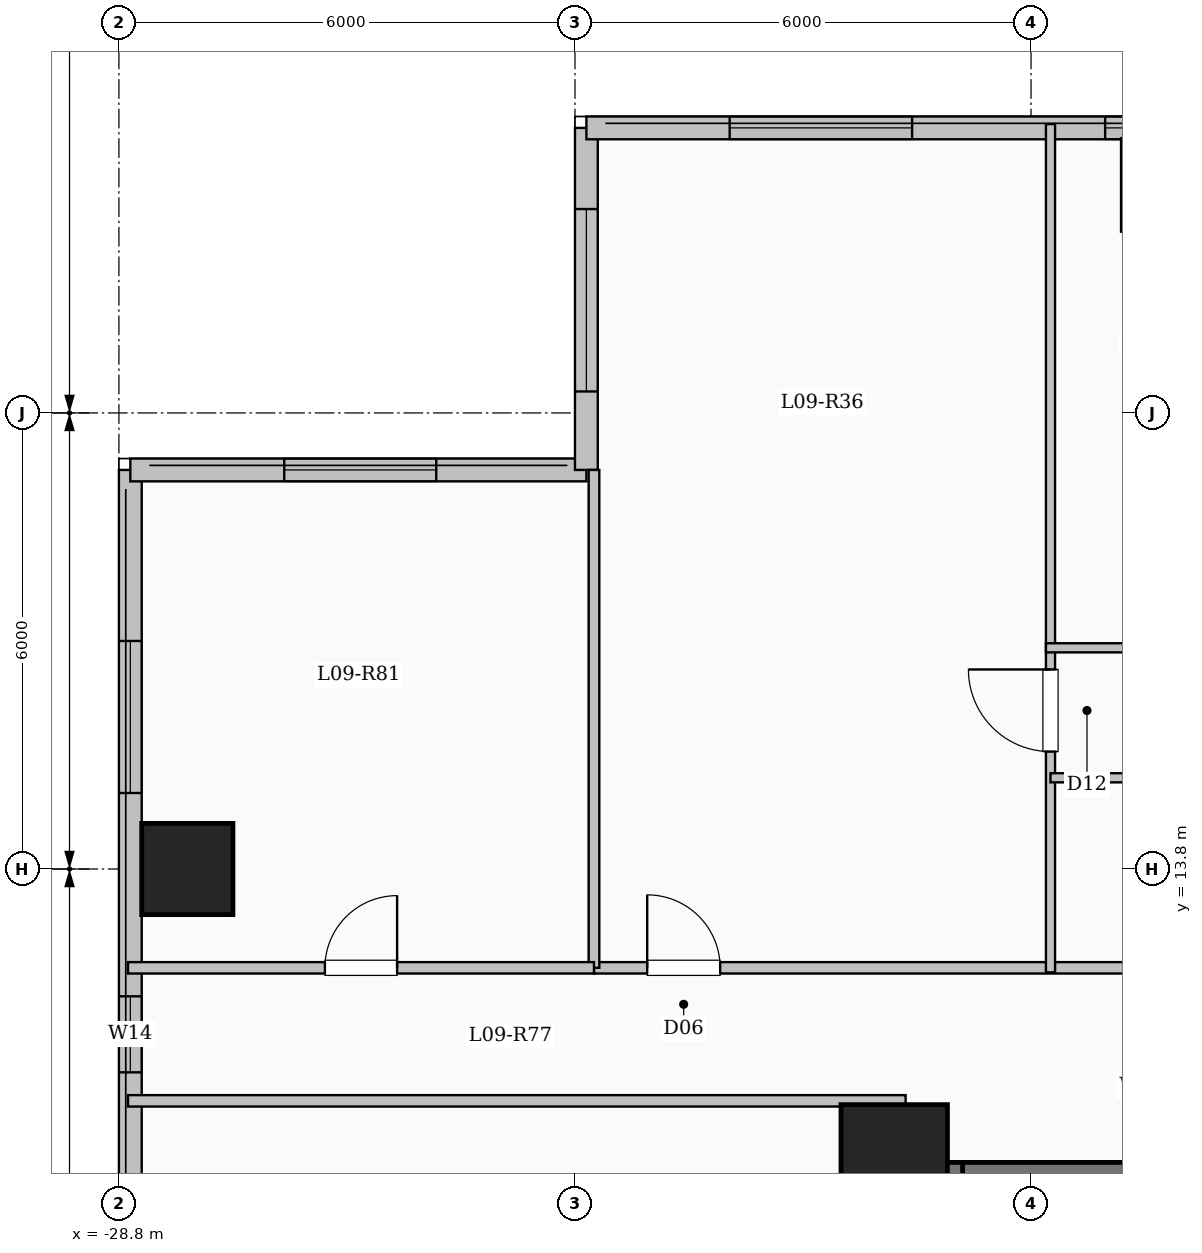
"""IFC4 building model, lengths in metres.
Left out: names, types, materials, properties, quantities, classifications, styles, units other than length and angle.
Written with IfcOpenShell. Run it as: python <this file> out.ifc"""

import sys

from ifc_helpers import new_model, si_unit, direction, frame, frame_2d, origin, origin_2d, place, context, subcontext, project, spatial, rectangle, extrude, element, fill, save


model = new_model("IFC4")
c1 = context("Model", 3, precision=1e-05, world=origin(), true_north=direction((0.0, 1.0)))
c2 = subcontext(c1, "Body", "Model", "MODEL_VIEW")
j1 = project(units=[si_unit("LENGTHUNIT", "METRE"), si_unit("PLANEANGLEUNIT", "RADIAN")], contexts=[c1])
p1 = place(None, origin())
s1 = spatial("IfcSite", under=j1, at=p1, CompositionType="ELEMENT")
p2 = place(p1, origin())
s2 = spatial("IfcBuilding", under=s1, at=p2, CompositionType="ELEMENT")
p3 = place(p2, frame((0.0, 0.0, 37.4)))
s3 = spatial("IfcBuildingStorey", under=s2, at=p3, CompositionType="ELEMENT", Elevation=37.4)
p4 = place(p3, frame((-18.6, 10.0, 0.0), z_axis=(0.0, 0.0, 1.0), x_axis=(1.0, 0.0, 0.0)))
e1 = element("IfcColumn", 1, at=p4, inside=s3, PredefinedType="COLUMN", context=c2, shape_type="SweptSolid", body=[
    extrude(rectangle(XDim=1.4, YDim=1.4, at=origin_2d()), origin(), (0.0, 0.0, 1.0), 3.35),
])
p5 = place(p3, frame((-27.9, 13.8, 0.0), z_axis=(0.0, 0.0, 1.0), x_axis=(1.0, 0.0, 0.0)))
e2 = element("IfcColumn", 2, at=p5, inside=s3, PredefinedType="COLUMN", context=c2, shape_type="SweptSolid", body=[
    extrude(rectangle(XDim=1.2, YDim=1.2, at=origin_2d()), origin(), (0.0, 0.0, 1.0), 3.35),
])
p6 = place(p3, frame((-28.65, -19.05, 0.0), z_axis=(0.0, 0.0, 1.0), x_axis=(0.0, 1.0, 0.0)))
e3 = element("IfcWall", 3, at=p6, inside=s3, PredefinedType="SOLIDWALL", context=c2, shape_type="SweptSolid", body=[
    extrude(rectangle(XDim=38.1, YDim=0.3, at=frame_2d((19.05, 0.0))), origin(), (0.0, 0.0, 1.0), 3.1),
])
p7 = place(p6, frame((3.15, 0.0, 0.9)))
e4 = element("IfcOpeningElement", 4, at=p7, cuts=e3, PredefinedType="OPENING", context=c2, shape_type="SweptSolid", body=[
    extrude(rectangle(XDim=2.4, YDim=1.8, at=frame_2d((1.2, 0.9))), frame((0.0, 0.16, 0.0), z_axis=(0.0, -1.0, 0.0), x_axis=(1.0, 0.0, 0.0)), (0.0, 0.0, 1.0), 0.32),
])
p8 = place(p6, frame((9.542, 0.0, 0.9)))
e5 = element("IfcOpeningElement", 5, at=p8, cuts=e3, PredefinedType="OPENING", context=c2, shape_type="SweptSolid", body=[
    extrude(rectangle(XDim=1.5, YDim=1.65, at=frame_2d((0.75, 0.825))), frame((0.0, 0.16, 0.0), z_axis=(0.0, -1.0, 0.0), x_axis=(1.0, 0.0, 0.0)), (0.0, 0.0, 1.0), 0.32),
])
p9 = place(p6, frame((19.8, 0.0, 0.9)))
e6 = element("IfcOpeningElement", 6, at=p9, cuts=e3, PredefinedType="OPENING", context=c2, shape_type="SweptSolid", body=[
    extrude(rectangle(XDim=2.0, YDim=1.7, at=frame_2d((1.0, 0.85))), frame((0.0, 0.16, 0.0), z_axis=(0.0, -1.0, 0.0), x_axis=(1.0, 0.0, 0.0)), (0.0, 0.0, 1.0), 0.32),
])
p10 = place(p6, frame((30.175, 0.0, 0.95)))
e7 = element("IfcOpeningElement", 7, at=p10, cuts=e3, PredefinedType="OPENING", context=c2, shape_type="SweptSolid", body=[
    extrude(rectangle(XDim=1.0, YDim=1.5, at=frame_2d((0.5, 0.75))), frame((0.0, 0.16, 0.0), z_axis=(0.0, -1.0, 0.0), x_axis=(1.0, 0.0, 0.0)), (0.0, 0.0, 1.0), 0.32),
])
p11 = place(p6, frame((33.85, 0.0, 0.9)))
e8 = element("IfcOpeningElement", 8, at=p11, cuts=e3, PredefinedType="OPENING", context=c2, shape_type="SweptSolid", body=[
    extrude(rectangle(XDim=2.0, YDim=1.7, at=frame_2d((1.0, 0.85))), frame((0.0, 0.16, 0.0), z_axis=(0.0, -1.0, 0.0), x_axis=(1.0, 0.0, 0.0)), (0.0, 0.0, 1.0), 0.32),
])
p12 = place(p3, frame((-28.65, 19.05, 0.0), z_axis=(0.0, 0.0, 1.0), x_axis=(1.0, 0.0, 0.0)))
e9 = element("IfcWall", 9, at=p12, inside=s3, PredefinedType="SOLIDWALL", context=c2, shape_type="SweptSolid", body=[
    extrude(rectangle(XDim=6.0, YDim=0.3, at=frame_2d((3.0, 0.0))), origin(), (0.0, 0.0, 1.0), 3.1),
])
p13 = place(p12, frame((2.025, 0.0, 0.9)))
e10 = element("IfcOpeningElement", 10, at=p13, cuts=e9, PredefinedType="OPENING", context=c2, shape_type="SweptSolid", body=[
    extrude(rectangle(XDim=2.0, YDim=1.7, at=frame_2d((1.0, 0.85))), frame((0.0, 0.16, 0.0), z_axis=(0.0, -1.0, 0.0), x_axis=(1.0, 0.0, 0.0)), (0.0, 0.0, 1.0), 0.32),
])
p14 = place(p3, frame((-22.65, 19.05, 0.0), z_axis=(0.0, 0.0, 1.0), x_axis=(0.0, 1.0, 0.0)))
e11 = element("IfcWall", 11, at=p14, inside=s3, PredefinedType="SOLIDWALL", context=c2, shape_type="SweptSolid", body=[
    extrude(rectangle(XDim=4.5, YDim=0.3, at=frame_2d((2.25, 0.0))), origin(), (0.0, 0.0, 1.0), 3.1),
])
p15 = place(p14, frame((1.032, 0.0, 0.9)))
e12 = element("IfcOpeningElement", 12, at=p15, cuts=e11, PredefinedType="OPENING", context=c2, shape_type="SweptSolid", body=[
    extrude(rectangle(XDim=2.4, YDim=1.8, at=frame_2d((1.2, 0.9))), frame((0.0, 0.16, 0.0), z_axis=(0.0, -1.0, 0.0), x_axis=(1.0, 0.0, 0.0)), (0.0, 0.0, 1.0), 0.32),
])
p16 = place(p3, frame((-22.65, 23.55, 0.0), z_axis=(0.0, 0.0, 1.0), x_axis=(1.0, 0.0, 0.0)))
e13 = element("IfcWall", 13, at=p16, inside=s3, PredefinedType="SOLIDWALL", context=c2, shape_type="SweptSolid", body=[
    extrude(rectangle(XDim=15.3, YDim=0.3, at=frame_2d((7.65, 0.0))), origin(), (0.0, 0.0, 1.0), 3.1),
])
p17 = place(p16, frame((1.885, 0.0, 0.9)))
e14 = element("IfcOpeningElement", 14, at=p17, cuts=e13, PredefinedType="OPENING", context=c2, shape_type="SweptSolid", body=[
    extrude(rectangle(XDim=2.4, YDim=1.8, at=frame_2d((1.2, 0.9))), frame((0.0, 0.16, 0.0), z_axis=(0.0, -1.0, 0.0), x_axis=(1.0, 0.0, 0.0)), (0.0, 0.0, 1.0), 0.32),
])
p18 = place(p16, frame((6.825, 0.0, 0.9)))
e15 = element("IfcOpeningElement", 15, at=p18, cuts=e13, PredefinedType="OPENING", context=c2, shape_type="SweptSolid", body=[
    extrude(rectangle(XDim=1.5, YDim=1.65, at=frame_2d((0.75, 0.825))), frame((0.0, 0.16, 0.0), z_axis=(0.0, -1.0, 0.0), x_axis=(1.0, 0.0, 0.0)), (0.0, 0.0, 1.0), 0.32),
])
p19 = place(p16, frame((9.835, 0.0, 0.9)))
e16 = element("IfcOpeningElement", 16, at=p19, cuts=e13, PredefinedType="OPENING", context=c2, shape_type="SweptSolid", body=[
    extrude(rectangle(XDim=1.5, YDim=1.65, at=frame_2d((0.75, 0.825))), frame((0.0, 0.16, 0.0), z_axis=(0.0, -1.0, 0.0), x_axis=(1.0, 0.0, 0.0)), (0.0, 0.0, 1.0), 0.32),
])
p20 = place(p16, frame((12.87, 0.0, 0.9)))
e17 = element("IfcOpeningElement", 17, at=p20, cuts=e13, PredefinedType="OPENING", context=c2, shape_type="SweptSolid", body=[
    extrude(rectangle(XDim=1.8, YDim=1.65, at=frame_2d((0.9, 0.825))), frame((0.0, 0.16, 0.0), z_axis=(0.0, -1.0, 0.0), x_axis=(1.0, 0.0, 0.0)), (0.0, 0.0, 1.0), 0.32),
])
p21 = place(p3, frame((-18.0, 9.79, 0.0), z_axis=(0.0, 0.0, 1.0), x_axis=(1.0, 0.0, 0.0)))
e18 = element("IfcWall", 18, at=p21, inside=s3, PredefinedType="SHEAR", context=c2, shape_type="SweptSolid", body=[
    extrude(rectangle(XDim=8.0, YDim=0.3, at=frame_2d((4.0, 0.0))), origin(), (0.0, 0.0, 1.0), 3.35),
])
p22 = place(p3, frame((-17.85, 6.35, 0.0), z_axis=(0.0, 0.0, 1.0), x_axis=(0.0, 1.0, 0.0)))
e19 = element("IfcWall", 19, at=p22, inside=s3, PredefinedType="SHEAR", context=c2, shape_type="SweptSolid", body=[
    extrude(rectangle(XDim=3.59, YDim=0.3, at=frame_2d((1.795, 0.0))), origin(), (0.0, 0.0, 1.0), 3.35),
])
p23 = place(p3, frame((-22.55, 12.5, 0.0), z_axis=(0.0, 0.0, 1.0), x_axis=(1.0, 0.0, 0.0)))
e20 = element("IfcWall", 20, at=p23, inside=s3, PredefinedType="PARTITIONING", context=c2, shape_type="SweptSolid", body=[
    extrude(rectangle(XDim=18.7, YDim=0.15, at=frame_2d((9.35, 0.0))), origin(), (0.0, 0.0, 1.0), 3.1),
])
p24 = place(p23, frame((0.7, 0.0, 0.0)))
e21 = element("IfcOpeningElement", 21, at=p24, cuts=e20, PredefinedType="OPENING", context=c2, shape_type="SweptSolid", body=[
    extrude(rectangle(XDim=0.96, YDim=2.15, at=frame_2d((0.48, 1.075))), frame((0.0, 0.085, 0.0), z_axis=(0.0, -1.0, 0.0), x_axis=(1.0, 0.0, 0.0)), (0.0, 0.0, 1.0), 0.17),
])
p25 = place(p23, frame((13.162, 0.0, 0.0)))
e22 = element("IfcOpeningElement", 22, at=p25, cuts=e20, PredefinedType="OPENING", context=c2, shape_type="SweptSolid", body=[
    extrude(rectangle(XDim=0.96, YDim=2.15, at=frame_2d((0.48, 1.075))), frame((0.0, 0.085, 0.0), z_axis=(0.0, -1.0, 0.0), x_axis=(1.0, 0.0, 0.0)), (0.0, 0.0, 1.0), 0.17),
])
p26 = place(p3, frame((-16.544, 12.44, 0.0), z_axis=(0.0, 0.0, 1.0), x_axis=(0.0, 1.0, 0.0)))
e23 = element("IfcWall", 23, at=p26, inside=s3, PredefinedType="PARTITIONING", context=c2, shape_type="SweptSolid", body=[
    extrude(rectangle(XDim=11.16, YDim=0.12, at=frame_2d((5.58, 0.0))), origin(), (0.0, 0.0, 1.0), 3.1),
])
p27 = place(p26, frame((2.905, 0.0, 0.0)))
e24 = element("IfcOpeningElement", 24, at=p27, cuts=e23, PredefinedType="OPENING", context=c2, shape_type="SweptSolid", body=[
    extrude(rectangle(XDim=1.08, YDim=2.15, at=frame_2d((0.54, 1.075))), frame((0.0, 0.07, 0.0), z_axis=(0.0, -1.0, 0.0), x_axis=(1.0, 0.0, 0.0)), (0.0, 0.0, 1.0), 0.14),
])
p28 = place(p3, frame((-16.544, 15.0, 0.0), z_axis=(0.0, 0.0, 1.0), x_axis=(1.0, 0.0, 0.0)))
e25 = element("IfcWall", 25, at=p28, inside=s3, PredefinedType="PARTITIONING", context=c2, shape_type="SweptSolid", body=[
    extrude(rectangle(XDim=3.151, YDim=0.12, at=frame_2d((1.575, 0.0))), origin(), (0.0, 0.0, 1.0), 2.585),
])
p29 = place(p28, frame((1.135, 0.0, 0.0)))
e26 = element("IfcOpeningElement", 26, at=p29, cuts=e25, PredefinedType="OPENING", context=c2, shape_type="SweptSolid", body=[
    extrude(rectangle(XDim=0.88, YDim=2.1, at=frame_2d((0.44, 1.05))), frame((0.0, 0.07, 0.0), z_axis=(0.0, -1.0, 0.0), x_axis=(1.0, 0.0, 0.0)), (0.0, 0.0, 1.0), 0.14),
])
p30 = place(p3, frame((-16.604, 16.71, 0.0), z_axis=(0.0, 0.0, 1.0), x_axis=(1.0, 0.0, 0.0)))
e27 = element("IfcWall", 27, at=p30, inside=s3, PredefinedType="PARTITIONING", context=c2, shape_type="SweptSolid", body=[
    extrude(rectangle(XDim=6.126, YDim=0.12, at=frame_2d((3.063, 0.0))), origin(), (0.0, 0.0, 1.0), 2.585),
])
p31 = place(p30, frame((1.046, 0.0, 0.0)))
e28 = element("IfcOpeningElement", 28, at=p31, cuts=e27, PredefinedType="OPENING", context=c2, shape_type="SweptSolid", body=[
    extrude(rectangle(XDim=0.88, YDim=2.1, at=frame_2d((0.44, 1.05))), frame((0.0, 0.07, 0.0), z_axis=(0.0, -1.0, 0.0), x_axis=(1.0, 0.0, 0.0)), (0.0, 0.0, 1.0), 0.14),
])
p32 = place(p30, frame((4.019, 0.0, 0.0)))
e29 = element("IfcOpeningElement", 29, at=p32, cuts=e27, PredefinedType="OPENING", context=c2, shape_type="SweptSolid", body=[
    extrude(rectangle(XDim=0.88, YDim=2.1, at=frame_2d((0.44, 1.05))), frame((0.0, 0.07, 0.0), z_axis=(0.0, -1.0, 0.0), x_axis=(1.0, 0.0, 0.0)), (0.0, 0.0, 1.0), 0.14),
])
p33 = place(p3, frame((-28.68, 10.75, 0.0), z_axis=(0.0, 0.0, 1.0), x_axis=(1.0, 0.0, 0.0)))
e30 = element("IfcWall", 30, at=p33, inside=s3, PredefinedType="PARTITIONING", context=c2, shape_type="SweptSolid", body=[
    extrude(rectangle(XDim=10.23, YDim=0.15, at=frame_2d((5.115, 0.0))), origin(), (0.0, 0.0, 1.0), 3.1),
])
p34 = place(p3, frame((-22.55, 12.5, 0.0), z_axis=(0.0, 0.0, 1.0), x_axis=(0.0, 1.0, 0.0)))
e31 = element("IfcWall", 31, at=p34, inside=s3, PredefinedType="PARTITIONING", context=c2, shape_type="SweptSolid", body=[
    extrude(rectangle(XDim=6.55, YDim=0.14, at=frame_2d((3.275, 0.0))), origin(), (0.0, 0.0, 1.0), 3.1),
])
p35 = place(p3, frame((-28.68, 12.5, 0.0), z_axis=(0.0, 0.0, 1.0), x_axis=(1.0, 0.0, 0.0)))
e32 = element("IfcWall", 32, at=p35, inside=s3, PredefinedType="PARTITIONING", context=c2, shape_type="SweptSolid", body=[
    extrude(rectangle(XDim=6.13, YDim=0.15, at=frame_2d((3.065, 0.0))), origin(), (0.0, 0.0, 1.0), 3.1),
])
p36 = place(p35, frame((2.59, 0.0, 0.0)))
e33 = element("IfcOpeningElement", 33, at=p36, cuts=e32, PredefinedType="OPENING", context=c2, shape_type="SweptSolid", body=[
    extrude(rectangle(XDim=0.95, YDim=2.15, at=frame_2d((0.475, 1.075))), frame((0.0, 0.085, 0.0), z_axis=(0.0, -1.0, 0.0), x_axis=(1.0, 0.0, 0.0)), (0.0, 0.0, 1.0), 0.17),
])
p37 = place(p10, origin())
e34 = element("IfcWindow", 34, at=p37, inside=s3, PartitioningType="SINGLE_PANEL", PredefinedType="WINDOW", context=c2, shape_type="SweptSolid", body=[
    extrude(rectangle(XDim=1.0, YDim=1.5, at=frame_2d((0.5, 0.75))), frame((0.0, 0.03, 0.0), z_axis=(0.0, -1.0, 0.0), x_axis=(1.0, 0.0, 0.0)), (0.0, 0.0, 1.0), 0.06),
])
fill(e7, e34)
p38 = place(p11, origin())
e35 = element("IfcWindow", 35, at=p38, inside=s3, PartitioningType="SINGLE_PANEL", PredefinedType="WINDOW", context=c2, shape_type="SweptSolid", body=[
    extrude(rectangle(XDim=2.0, YDim=1.7, at=frame_2d((1.0, 0.85))), frame((0.0, 0.03, 0.0), z_axis=(0.0, -1.0, 0.0), x_axis=(1.0, 0.0, 0.0)), (0.0, 0.0, 1.0), 0.06),
])
fill(e8, e35)
p39 = place(p13, origin())
e36 = element("IfcWindow", 36, at=p39, inside=s3, PartitioningType="SINGLE_PANEL", PredefinedType="WINDOW", context=c2, shape_type="SweptSolid", body=[
    extrude(rectangle(XDim=2.0, YDim=1.7, at=frame_2d((1.0, 0.85))), frame((0.0, 0.03, 0.0), z_axis=(0.0, -1.0, 0.0), x_axis=(1.0, 0.0, 0.0)), (0.0, 0.0, 1.0), 0.06),
])
fill(e10, e36)
p40 = place(p15, origin())
e37 = element("IfcWindow", 37, at=p40, inside=s3, PartitioningType="SINGLE_PANEL", PredefinedType="WINDOW", context=c2, shape_type="SweptSolid", body=[
    extrude(rectangle(XDim=2.4, YDim=1.8, at=frame_2d((1.2, 0.9))), frame((0.0, 0.03, 0.0), z_axis=(0.0, -1.0, 0.0), x_axis=(1.0, 0.0, 0.0)), (0.0, 0.0, 1.0), 0.06),
])
fill(e12, e37)
p41 = place(p17, origin())
e38 = element("IfcWindow", 38, at=p41, inside=s3, PartitioningType="SINGLE_PANEL", PredefinedType="WINDOW", context=c2, shape_type="SweptSolid", body=[
    extrude(rectangle(XDim=2.4, YDim=1.8, at=frame_2d((1.2, 0.9))), frame((0.0, 0.03, 0.0), z_axis=(0.0, -1.0, 0.0), x_axis=(1.0, 0.0, 0.0)), (0.0, 0.0, 1.0), 0.06),
])
fill(e14, e38)
p42 = place(p18, origin())
e39 = element("IfcWindow", 39, at=p42, inside=s3, PartitioningType="SINGLE_PANEL", PredefinedType="WINDOW", context=c2, shape_type="SweptSolid", body=[
    extrude(rectangle(XDim=1.5, YDim=1.65, at=frame_2d((0.75, 0.825))), frame((0.0, 0.03, 0.0), z_axis=(0.0, -1.0, 0.0), x_axis=(1.0, 0.0, 0.0)), (0.0, 0.0, 1.0), 0.06),
])
fill(e15, e39)
p43 = place(p24, origin())
e40 = element("IfcDoor", 40, at=p43, inside=s3, OperationType="SINGLE_SWING_LEFT", PredefinedType="DOOR", context=c2, shape_type="SweptSolid", body=[
    extrude(rectangle(XDim=0.96, YDim=2.15, at=frame_2d((0.48, 1.075))), frame((0.0, 0.025, 0.0), z_axis=(0.0, -1.0, 0.0), x_axis=(1.0, 0.0, 0.0)), (0.0, 0.0, 1.0), 0.05),
])
fill(e21, e40)
p44 = place(p27, origin())
e41 = element("IfcDoor", 41, at=p44, inside=s3, OperationType="SINGLE_SWING_RIGHT", PredefinedType="DOOR", context=c2, shape_type="SweptSolid", body=[
    extrude(rectangle(XDim=1.08, YDim=2.15, at=frame_2d((0.54, 1.075))), frame((0.0, 0.025, 0.0), z_axis=(0.0, -1.0, 0.0), x_axis=(1.0, 0.0, 0.0)), (0.0, 0.0, 1.0), 0.05),
])
fill(e24, e41)
p45 = place(p36, origin())
e42 = element("IfcDoor", 42, at=p45, inside=s3, OperationType="SINGLE_SWING_RIGHT", PredefinedType="DOOR", context=c2, shape_type="SweptSolid", body=[
    extrude(rectangle(XDim=0.95, YDim=2.15, at=frame_2d((0.475, 1.075))), frame((0.0, 0.025, 0.0), z_axis=(0.0, -1.0, 0.0), x_axis=(1.0, 0.0, 0.0)), (0.0, 0.0, 1.0), 0.05),
])
fill(e33, e42)
save(model, sys.argv[1])
